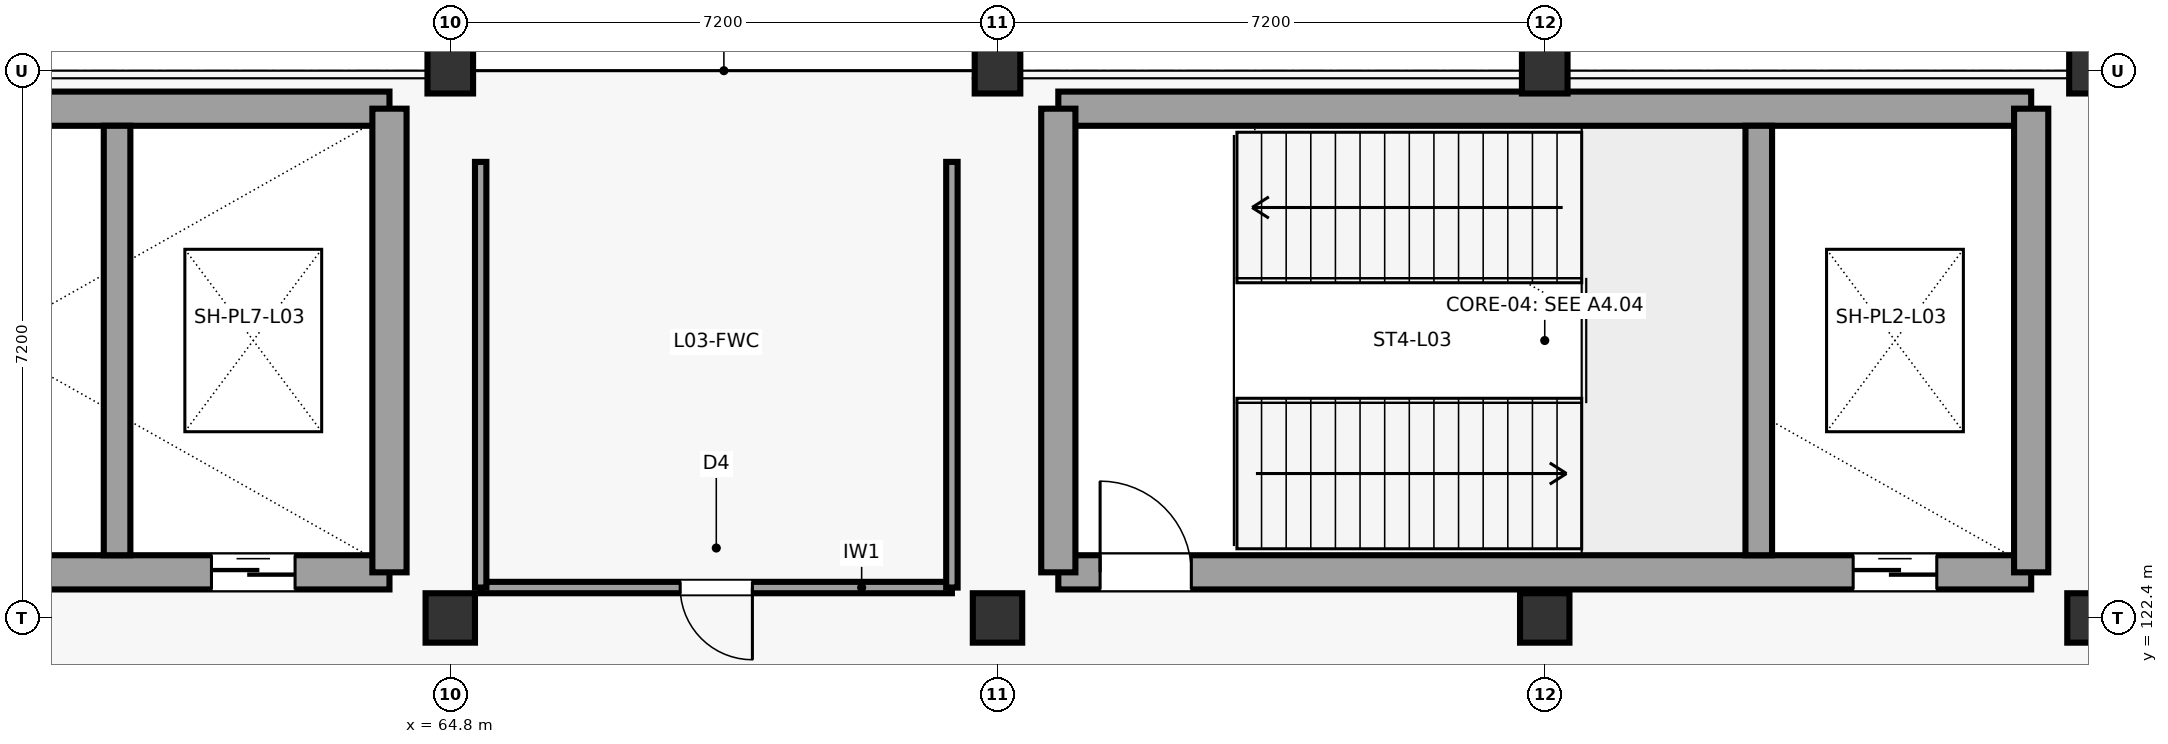
"""IFC4 building model, lengths in metres.
Left out: names, types, materials, properties, quantities, classifications, styles, units other than length and angle.
Written with IfcOpenShell. Run it as: python <this file> out.ifc"""

import sys

from ifc_helpers import new_model, si_unit, direction, frame, frame_2d, origin, origin_2d, place, context, subcontext, project, spatial, rectangle, extrude, element, fill, save


model = new_model("IFC4")
c1 = context("Model", 3, precision=1e-05, world=origin(), true_north=direction((0.0, 1.0)))
c2 = subcontext(c1, "Body", "Model", "MODEL_VIEW")
j1 = project(units=[si_unit("LENGTHUNIT", "METRE"), si_unit("PLANEANGLEUNIT", "RADIAN")], contexts=[c1])
p1 = place(None, origin())
s1 = spatial("IfcSite", under=j1, at=p1, CompositionType="ELEMENT")
p2 = place(p1, origin())
s2 = spatial("IfcBuilding", under=s1, at=p2, CompositionType="ELEMENT")
p3 = place(p2, frame((0.0, 0.0, 13.8)))
s3 = spatial("IfcBuildingStorey", under=s2, at=p3, CompositionType="ELEMENT", Elevation=13.8)
p4 = place(p3, frame((64.8, 122.4, 0.0), z_axis=(0.0, 0.0, 1.0), x_axis=(1.0, 0.0, 0.0)))
e1 = element("IfcColumn", 1, at=p4, inside=s3, PredefinedType="COLUMN", context=c2, shape_type="SweptSolid", body=[
    extrude(rectangle(XDim=0.65, YDim=0.65, at=origin_2d()), origin(), (0.0, 0.0, 1.0), 4.8),
])
p5 = place(p3, frame((64.8, 129.6, 0.0), z_axis=(0.0, 0.0, 1.0), x_axis=(1.0, 0.0, 0.0)))
e2 = element("IfcColumn", 2, at=p5, inside=s3, PredefinedType="COLUMN", context=c2, shape_type="SweptSolid", body=[
    extrude(rectangle(XDim=0.6, YDim=0.6, at=origin_2d()), origin(), (0.0, 0.0, 1.0), 4.8),
])
p6 = place(p3, frame((72.0, 122.4, 0.0), z_axis=(0.0, 0.0, 1.0), x_axis=(1.0, 0.0, 0.0)))
e3 = element("IfcColumn", 3, at=p6, inside=s3, PredefinedType="COLUMN", context=c2, shape_type="SweptSolid", body=[
    extrude(rectangle(XDim=0.65, YDim=0.65, at=origin_2d()), origin(), (0.0, 0.0, 1.0), 4.8),
])
p7 = place(p3, frame((72.0, 129.6, 0.0), z_axis=(0.0, 0.0, 1.0), x_axis=(1.0, 0.0, 0.0)))
e4 = element("IfcColumn", 4, at=p7, inside=s3, PredefinedType="COLUMN", context=c2, shape_type="SweptSolid", body=[
    extrude(rectangle(XDim=0.6, YDim=0.6, at=origin_2d()), origin(), (0.0, 0.0, 1.0), 4.8),
])
p8 = place(p3, frame((79.2, 122.4, 0.0), z_axis=(0.0, 0.0, 1.0), x_axis=(1.0, 0.0, 0.0)))
e5 = element("IfcColumn", 5, at=p8, inside=s3, PredefinedType="COLUMN", context=c2, shape_type="SweptSolid", body=[
    extrude(rectangle(XDim=0.65, YDim=0.65, at=origin_2d()), origin(), (0.0, 0.0, 1.0), 4.8),
])
p9 = place(p3, frame((79.2, 129.6, 0.0), z_axis=(0.0, 0.0, 1.0), x_axis=(1.0, 0.0, 0.0)))
e6 = element("IfcColumn", 6, at=p9, inside=s3, PredefinedType="COLUMN", context=c2, shape_type="SweptSolid", body=[
    extrude(rectangle(XDim=0.6, YDim=0.6, at=origin_2d()), origin(), (0.0, 0.0, 1.0), 4.8),
])
p10 = place(p3, frame((86.4, 122.4, 0.0), z_axis=(0.0, 0.0, 1.0), x_axis=(1.0, 0.0, 0.0)))
e7 = element("IfcColumn", 7, at=p10, inside=s3, PredefinedType="COLUMN", context=c2, shape_type="SweptSolid", body=[
    extrude(rectangle(XDim=0.65, YDim=0.65, at=origin_2d()), origin(), (0.0, 0.0, 1.0), 4.8),
])
p11 = place(p3, frame((86.4, 129.6, 0.0), z_axis=(0.0, 0.0, 1.0), x_axis=(1.0, 0.0, 0.0)))
e8 = element("IfcColumn", 8, at=p11, inside=s3, PredefinedType="COLUMN", context=c2, shape_type="SweptSolid", body=[
    extrude(rectangle(XDim=0.6, YDim=0.6, at=origin_2d()), origin(), (0.0, 0.0, 1.0), 4.8),
])
p12 = place(p3, frame((72.8, 123.0, 0.0), z_axis=(0.0, 0.0, 1.0), x_axis=(1.0, 0.0, 0.0)))
e9 = element("IfcWall", 9, at=p12, inside=s3, PredefinedType="SHEAR", context=c2, shape_type="SweptSolid", body=[
    extrude(rectangle(XDim=12.8, YDim=0.45, at=frame_2d((6.4, 0.0))), origin(), (0.0, 0.0, 1.0), 4.53),
])
p13 = place(p12, frame((0.55, 0.0, 0.0)))
e10 = element("IfcOpeningElement", 10, at=p13, cuts=e9, PredefinedType="OPENING", context=c2, shape_type="SweptSolid", body=[
    extrude(rectangle(XDim=1.2, YDim=2.25, at=frame_2d((0.6, 1.125))), frame((0.0, 0.235, 0.0), z_axis=(0.0, -1.0, 0.0), x_axis=(1.0, 0.0, 0.0)), (0.0, 0.0, 1.0), 0.47),
])
p14 = place(p12, frame((10.458, 0.0, 0.0)))
e11 = element("IfcOpeningElement", 11, at=p14, cuts=e9, PredefinedType="OPENING", context=c2, shape_type="SweptSolid", body=[
    extrude(rectangle(XDim=1.1, YDim=2.2, at=frame_2d((0.55, 1.1))), frame((0.0, 0.235, 0.0), z_axis=(0.0, -1.0, 0.0), x_axis=(1.0, 0.0, 0.0)), (0.0, 0.0, 1.0), 0.47),
])
p15 = place(p3, frame((72.8, 129.1, 0.0), z_axis=(0.0, 0.0, 1.0), x_axis=(1.0, 0.0, 0.0)))
e12 = element("IfcWall", 12, at=p15, inside=s3, PredefinedType="SHEAR", context=c2, shape_type="SweptSolid", body=[
    extrude(rectangle(XDim=12.8, YDim=0.45, at=frame_2d((6.4, 0.0))), origin(), (0.0, 0.0, 1.0), 4.53),
])
for number, where, z_axis, x_axis in (
    (13, (72.8, 123.0, 0.0), (0.0, 0.0, 1.0), (0.0, 1.0, 0.0)),
    (14, (85.6, 123.0, 0.0), (0.0, 0.0, 1.0), (0.0, 1.0, 0.0)),
):
    element("IfcWall", number, at=place(p3, frame(where, z_axis=z_axis, x_axis=x_axis)), inside=s3, PredefinedType="SHEAR", context=c2, shape_type="SweptSolid", body=[
        extrude(rectangle(XDim=6.1, YDim=0.45, at=frame_2d((3.05, 0.0))), origin(), (0.0, 0.0, 1.0), 4.53),
    ])
p16 = place(p3, frame((82.016, 123.225, 0.0), z_axis=(0.0, 0.0, 1.0), x_axis=(0.0, 1.0, 0.0)))
e15 = element("IfcWall", 15, at=p16, inside=s3, PredefinedType="SHEAR", context=c2, shape_type="SweptSolid", body=[
    extrude(rectangle(XDim=5.65, YDim=0.35, at=frame_2d((2.825, 0.0))), origin(), (0.0, 0.0, 1.0), 4.53),
])
p17 = place(p3, frame((51.2, 123.0, 0.0), z_axis=(0.0, 0.0, 1.0), x_axis=(1.0, 0.0, 0.0)))
e16 = element("IfcWall", 16, at=p17, inside=s3, PredefinedType="SHEAR", context=c2, shape_type="SweptSolid", body=[
    extrude(rectangle(XDim=12.8, YDim=0.45, at=frame_2d((6.4, 0.0))), origin(), (0.0, 0.0, 1.0), 4.53),
])
p18 = place(p17, frame((0.55, 0.0, 0.0)))
e17 = element("IfcOpeningElement", 17, at=p18, cuts=e16, PredefinedType="OPENING", context=c2, shape_type="SweptSolid", body=[
    extrude(rectangle(XDim=1.2, YDim=2.25, at=frame_2d((0.6, 1.125))), frame((0.0, 0.235, 0.0), z_axis=(0.0, -1.0, 0.0), x_axis=(1.0, 0.0, 0.0)), (0.0, 0.0, 1.0), 0.47),
])
p19 = place(p17, frame((10.458, 0.0, 0.0)))
e18 = element("IfcOpeningElement", 18, at=p19, cuts=e16, PredefinedType="OPENING", context=c2, shape_type="SweptSolid", body=[
    extrude(rectangle(XDim=1.1, YDim=2.2, at=frame_2d((0.55, 1.1))), frame((0.0, 0.235, 0.0), z_axis=(0.0, -1.0, 0.0), x_axis=(1.0, 0.0, 0.0)), (0.0, 0.0, 1.0), 0.47),
])
p20 = place(p3, frame((51.2, 129.1, 0.0), z_axis=(0.0, 0.0, 1.0), x_axis=(1.0, 0.0, 0.0)))
e19 = element("IfcWall", 19, at=p20, inside=s3, PredefinedType="SHEAR", context=c2, shape_type="SweptSolid", body=[
    extrude(rectangle(XDim=12.8, YDim=0.45, at=frame_2d((6.4, 0.0))), origin(), (0.0, 0.0, 1.0), 4.53),
])
p21 = place(p3, frame((64.0, 123.0, 0.0), z_axis=(0.0, 0.0, 1.0), x_axis=(0.0, 1.0, 0.0)))
e20 = element("IfcWall", 20, at=p21, inside=s3, PredefinedType="SHEAR", context=c2, shape_type="SweptSolid", body=[
    extrude(rectangle(XDim=6.1, YDim=0.45, at=frame_2d((3.05, 0.0))), origin(), (0.0, 0.0, 1.0), 4.53),
])
p22 = place(p3, frame((60.416, 123.225, 0.0), z_axis=(0.0, 0.0, 1.0), x_axis=(0.0, 1.0, 0.0)))
e21 = element("IfcWall", 21, at=p22, inside=s3, PredefinedType="SHEAR", context=c2, shape_type="SweptSolid", body=[
    extrude(rectangle(XDim=5.65, YDim=0.35, at=frame_2d((2.825, 0.0))), origin(), (0.0, 0.0, 1.0), 4.53),
])
p23 = place(p3, frame((65.2, 122.8, 0.0), z_axis=(0.0, 0.0, 1.0), x_axis=(1.0, 0.0, 0.0)))
e22 = element("IfcWall", 22, at=p23, inside=s3, PredefinedType="PARTITIONING", context=c2, shape_type="SweptSolid", body=[
    extrude(rectangle(XDim=6.2, YDim=0.15, at=frame_2d((3.1, 0.0))), origin(), (0.0, 0.0, 1.0), 3.59),
])
p24 = place(p23, frame((2.625, 0.0, 0.0)))
e23 = element("IfcOpeningElement", 23, at=p24, cuts=e22, PredefinedType="OPENING", context=c2, shape_type="SweptSolid", body=[
    extrude(rectangle(XDim=0.95, YDim=2.15, at=frame_2d((0.475, 1.075))), frame((0.0, 0.085, 0.0), z_axis=(0.0, -1.0, 0.0), x_axis=(1.0, 0.0, 0.0)), (0.0, 0.0, 1.0), 0.17),
])
for number, where, z_axis, x_axis in (
    (24, (71.4, 122.8, 0.0), (0.0, 0.0, 1.0), (0.0, 1.0, 0.0)),
    (25, (65.2, 128.4, 0.0), (0.0, 0.0, 1.0), (0.0, -1.0, 0.0)),
):
    element("IfcWall", number, at=place(p3, frame(where, z_axis=z_axis, x_axis=x_axis)), inside=s3, PredefinedType="PARTITIONING", context=c2, shape_type="SweptSolid", body=[
        extrude(rectangle(XDim=5.6, YDim=0.15, at=frame_2d((2.8, 0.0))), origin(), (0.0, 0.0, 1.0), 3.59),
    ])
p25 = place(p13, origin())
e26 = element("IfcDoor", 26, at=p25, inside=s3, OperationType="SINGLE_SWING_LEFT", PredefinedType="DOOR", context=c2, shape_type="SweptSolid", body=[
    extrude(rectangle(XDim=1.2, YDim=2.25, at=frame_2d((0.6, 1.125))), frame((0.0, 0.025, 0.0), z_axis=(0.0, -1.0, 0.0), x_axis=(1.0, 0.0, 0.0)), (0.0, 0.0, 1.0), 0.05),
])
fill(e10, e26)
p26 = place(p14, origin())
e27 = element("IfcDoor", 27, at=p26, inside=s3, OperationType="SLIDING_TO_LEFT", PredefinedType="DOOR", context=c2, shape_type="SweptSolid", body=[
    extrude(rectangle(XDim=1.1, YDim=2.2, at=frame_2d((0.55, 1.1))), frame((0.0, 0.025, 0.0), z_axis=(0.0, -1.0, 0.0), x_axis=(1.0, 0.0, 0.0)), (0.0, 0.0, 1.0), 0.05),
])
fill(e11, e27)
p27 = place(p19, origin())
e28 = element("IfcDoor", 28, at=p27, inside=s3, OperationType="SLIDING_TO_RIGHT", PredefinedType="DOOR", context=c2, shape_type="SweptSolid", body=[
    extrude(rectangle(XDim=1.1, YDim=2.2, at=frame_2d((0.55, 1.1))), frame((0.0, 0.025, 0.0), z_axis=(0.0, -1.0, 0.0), x_axis=(1.0, 0.0, 0.0)), (0.0, 0.0, 1.0), 0.05),
])
fill(e18, e28)
p28 = place(p24, frame((0.95, 0.0, 0.0), z_axis=(0.0, 0.0, 1.0), x_axis=(-1.0, 0.0, 0.0)))
e29 = element("IfcDoor", 29, at=p28, inside=s3, OperationType="SINGLE_SWING_RIGHT", PredefinedType="DOOR", context=c2, shape_type="SweptSolid", body=[
    extrude(rectangle(XDim=0.95, YDim=2.15, at=frame_2d((0.475, 1.075))), frame((0.0, 0.025, 0.0), z_axis=(0.0, -1.0, 0.0), x_axis=(1.0, 0.0, 0.0)), (0.0, 0.0, 1.0), 0.05),
])
fill(e23, e29)
save(model, sys.argv[1])
